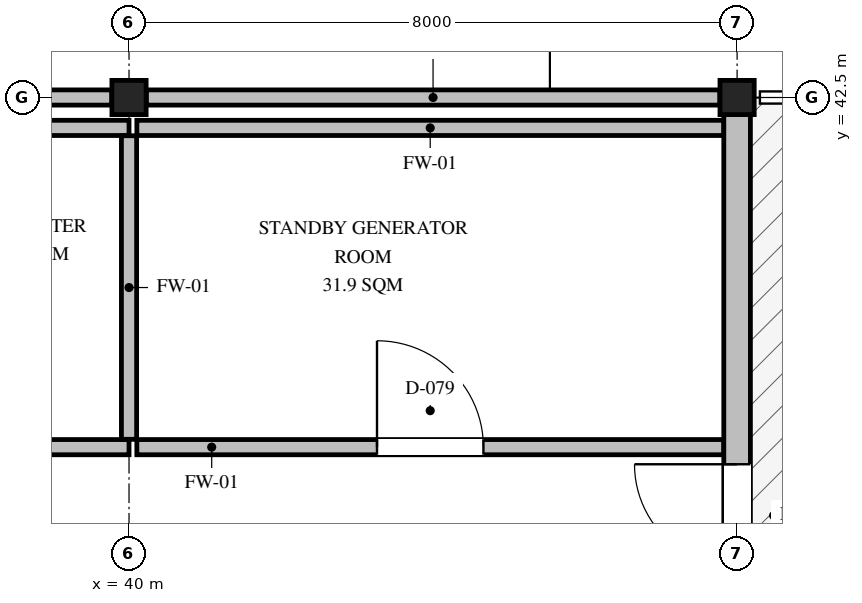
"""IFC4 building model, lengths in metres.
Left out: names, types, materials, properties, quantities, classifications, styles, units other than length and angle.
Written with IfcOpenShell. Run it as: python <this file> out.ifc"""

import sys

from ifc_helpers import new_model, si_unit, direction, frame, frame_2d, origin, origin_2d, place, context, subcontext, project, spatial, rectangle, hollow_rectangle, extrude, element, fill, save


model = new_model("IFC4")
c1 = context("Model", 3, precision=1e-05, world=origin(), true_north=direction((0.0, 1.0)))
c2 = subcontext(c1, "Body", "Model", "MODEL_VIEW")
j1 = project(units=[si_unit("LENGTHUNIT", "METRE"), si_unit("PLANEANGLEUNIT", "RADIAN")], contexts=[c1])
p1 = place(None, origin())
s1 = spatial("IfcSite", under=j1, at=p1, CompositionType="ELEMENT")
p2 = place(p1, origin())
s2 = spatial("IfcBuilding", under=s1, at=p2, CompositionType="ELEMENT")
p3 = place(p2, frame((0.0, 0.0, 0.45)))
s3 = spatial("IfcBuildingStorey", under=s2, at=p3, CompositionType="ELEMENT", Elevation=0.45)
for number, where, z_axis, x_axis in (
    (1, (40.0, 42.5, -0.45), (0.0, 0.0, 1.0), (1.0, 0.0, 0.0)),
    (2, (48.0, 42.5, -0.45), (0.0, 0.0, 1.0), (1.0, 0.0, 0.0)),
):
    element("IfcColumn", number, at=place(p3, frame(where, z_axis=z_axis, x_axis=x_axis)), inside=s3, PredefinedType="COLUMN", context=c2, shape_type="SweptSolid", body=[
        extrude(hollow_rectangle(XDim=0.45, YDim=0.45, WallThickness=0.022, at=origin_2d()), origin(), (0.0, 0.0, 1.0), 5.85),
    ])
p4 = place(p3, frame((48.0, 35.675, 0.0), z_axis=(0.0, 0.0, 1.0), x_axis=(0.0, 1.0, 0.0)))
e3 = element("IfcWall", 3, at=p4, inside=s3, PredefinedType="SOLIDWALL", context=c2, shape_type="SweptSolid", body=[
    extrude(rectangle(XDim=6.6, YDim=0.35, at=frame_2d((3.3, 0.0))), origin(), (0.0, 0.0, 1.0), 4.644),
])
p5 = place(p4, frame((0.65, 0.0, 0.0)))
e4 = element("IfcOpeningElement", 4, at=p5, cuts=e3, PredefinedType="OPENING", context=c2, shape_type="SweptSolid", body=[
    extrude(rectangle(XDim=1.35, YDim=2.3, at=frame_2d((0.675, 1.15))), frame((0.0, 0.185, 0.0), z_axis=(0.0, -1.0, 0.0), x_axis=(1.0, 0.0, 0.0)), (0.0, 0.0, 1.0), 0.37),
])
p6 = place(p3, frame((32.227, 42.5, 0.0), z_axis=(0.0, 0.0, 1.0), x_axis=(1.0, 0.0, 0.0)))
e5 = element("IfcWall", 5, at=p6, inside=s3, PredefinedType="PARTITIONING", context=c2, shape_type="SweptSolid", body=[
    extrude(rectangle(XDim=7.546, YDim=0.2, at=frame_2d((3.773, 0.0))), origin(), (0.0, 0.0, 1.0), 4.654),
])
p7 = place(p3, frame((40.227, 42.5, 0.0), z_axis=(0.0, 0.0, 1.0), x_axis=(1.0, 0.0, 0.0)))
e6 = element("IfcWall", 6, at=p7, inside=s3, PredefinedType="PARTITIONING", context=c2, shape_type="SweptSolid", body=[
    extrude(rectangle(XDim=7.546, YDim=0.2, at=frame_2d((3.773, 0.0))), origin(), (0.0, 0.0, 1.0), 4.754),
])
p8 = place(p3, frame((32.4, 37.9, 0.0), z_axis=(0.0, 0.0, 1.0), x_axis=(1.0, 0.0, 0.0)))
e7 = element("IfcWall", 7, at=p8, inside=s3, PredefinedType="PARTITIONING", context=c2, shape_type="SweptSolid", body=[
    extrude(rectangle(XDim=7.6, YDim=0.2, at=frame_2d((3.8, 0.0))), origin(), (0.0, 0.0, 1.0), 5.16),
])
p9 = place(p8, frame((3.1, 0.0, 0.0)))
e8 = element("IfcOpeningElement", 8, at=p9, cuts=e7, PredefinedType="OPENING", context=c2, shape_type="SweptSolid", body=[
    extrude(rectangle(XDim=1.4, YDim=2.2, at=frame_2d((0.7, 1.1))), frame((0.0, 0.11, 0.0), z_axis=(0.0, -1.0, 0.0), x_axis=(1.0, 0.0, 0.0)), (0.0, 0.0, 1.0), 0.22),
])
p10 = place(p3, frame((32.4, 42.1, 0.0), z_axis=(0.0, 0.0, 1.0), x_axis=(1.0, 0.0, 0.0)))
e9 = element("IfcWall", 9, at=p10, inside=s3, PredefinedType="PARTITIONING", context=c2, shape_type="SweptSolid", body=[
    extrude(rectangle(XDim=7.6, YDim=0.2, at=frame_2d((3.8, 0.0))), origin(), (0.0, 0.0, 1.0), 5.16),
])
p11 = place(p3, frame((40.0, 38.003, 0.0), z_axis=(0.0, 0.0, 1.0), x_axis=(0.0, 1.0, 0.0)))
e10 = element("IfcWall", 10, at=p11, inside=s3, PredefinedType="PARTITIONING", context=c2, shape_type="SweptSolid", body=[
    extrude(rectangle(XDim=3.994, YDim=0.2, at=frame_2d((1.997, 0.0))), origin(), (0.0, 0.0, 1.0), 4.714),
])
p12 = place(p3, frame((40.103, 37.9, 0.0), z_axis=(0.0, 0.0, 1.0), x_axis=(1.0, 0.0, 0.0)))
e11 = element("IfcWall", 11, at=p12, inside=s3, PredefinedType="PARTITIONING", context=c2, shape_type="SweptSolid", body=[
    extrude(rectangle(XDim=7.719, YDim=0.2, at=frame_2d((3.859, 0.0))), origin(), (0.0, 0.0, 1.0), 5.16),
])
p13 = place(p12, frame((3.159, 0.0, 0.0)))
e12 = element("IfcOpeningElement", 12, at=p13, cuts=e11, PredefinedType="OPENING", context=c2, shape_type="SweptSolid", body=[
    extrude(rectangle(XDim=1.4, YDim=2.2, at=frame_2d((0.7, 1.1))), frame((0.0, 0.11, 0.0), z_axis=(0.0, -1.0, 0.0), x_axis=(1.0, 0.0, 0.0)), (0.0, 0.0, 1.0), 0.22),
])
p14 = place(p3, frame((40.103, 42.1, 0.0), z_axis=(0.0, 0.0, 1.0), x_axis=(1.0, 0.0, 0.0)))
e13 = element("IfcWall", 13, at=p14, inside=s3, PredefinedType="PARTITIONING", context=c2, shape_type="SweptSolid", body=[
    extrude(rectangle(XDim=7.719, YDim=0.2, at=frame_2d((3.859, 0.0))), origin(), (0.0, 0.0, 1.0), 5.16),
])
p15 = place(p5, frame((1.35, 0.0, 0.0), z_axis=(0.0, 0.0, 1.0), x_axis=(-1.0, 0.0, 0.0)))
e14 = element("IfcDoor", 14, at=p15, inside=s3, OperationType="SINGLE_SWING_RIGHT", PredefinedType="DOOR", context=c2, shape_type="SweptSolid", body=[
    extrude(rectangle(XDim=1.35, YDim=2.3, at=frame_2d((0.675, 1.15))), frame((0.0, 0.025, 0.0), z_axis=(0.0, -1.0, 0.0), x_axis=(1.0, 0.0, 0.0)), (0.0, 0.0, 1.0), 0.05),
])
fill(e4, e14)
p16 = place(p13, origin())
e15 = element("IfcDoor", 15, at=p16, inside=s3, OperationType="SINGLE_SWING_LEFT", PredefinedType="DOOR", context=c2, shape_type="SweptSolid", body=[
    extrude(rectangle(XDim=1.4, YDim=2.2, at=frame_2d((0.7, 1.1))), frame((0.0, 0.025, 0.0), z_axis=(0.0, -1.0, 0.0), x_axis=(1.0, 0.0, 0.0)), (0.0, 0.0, 1.0), 0.05),
])
fill(e12, e15)
save(model, sys.argv[1])
